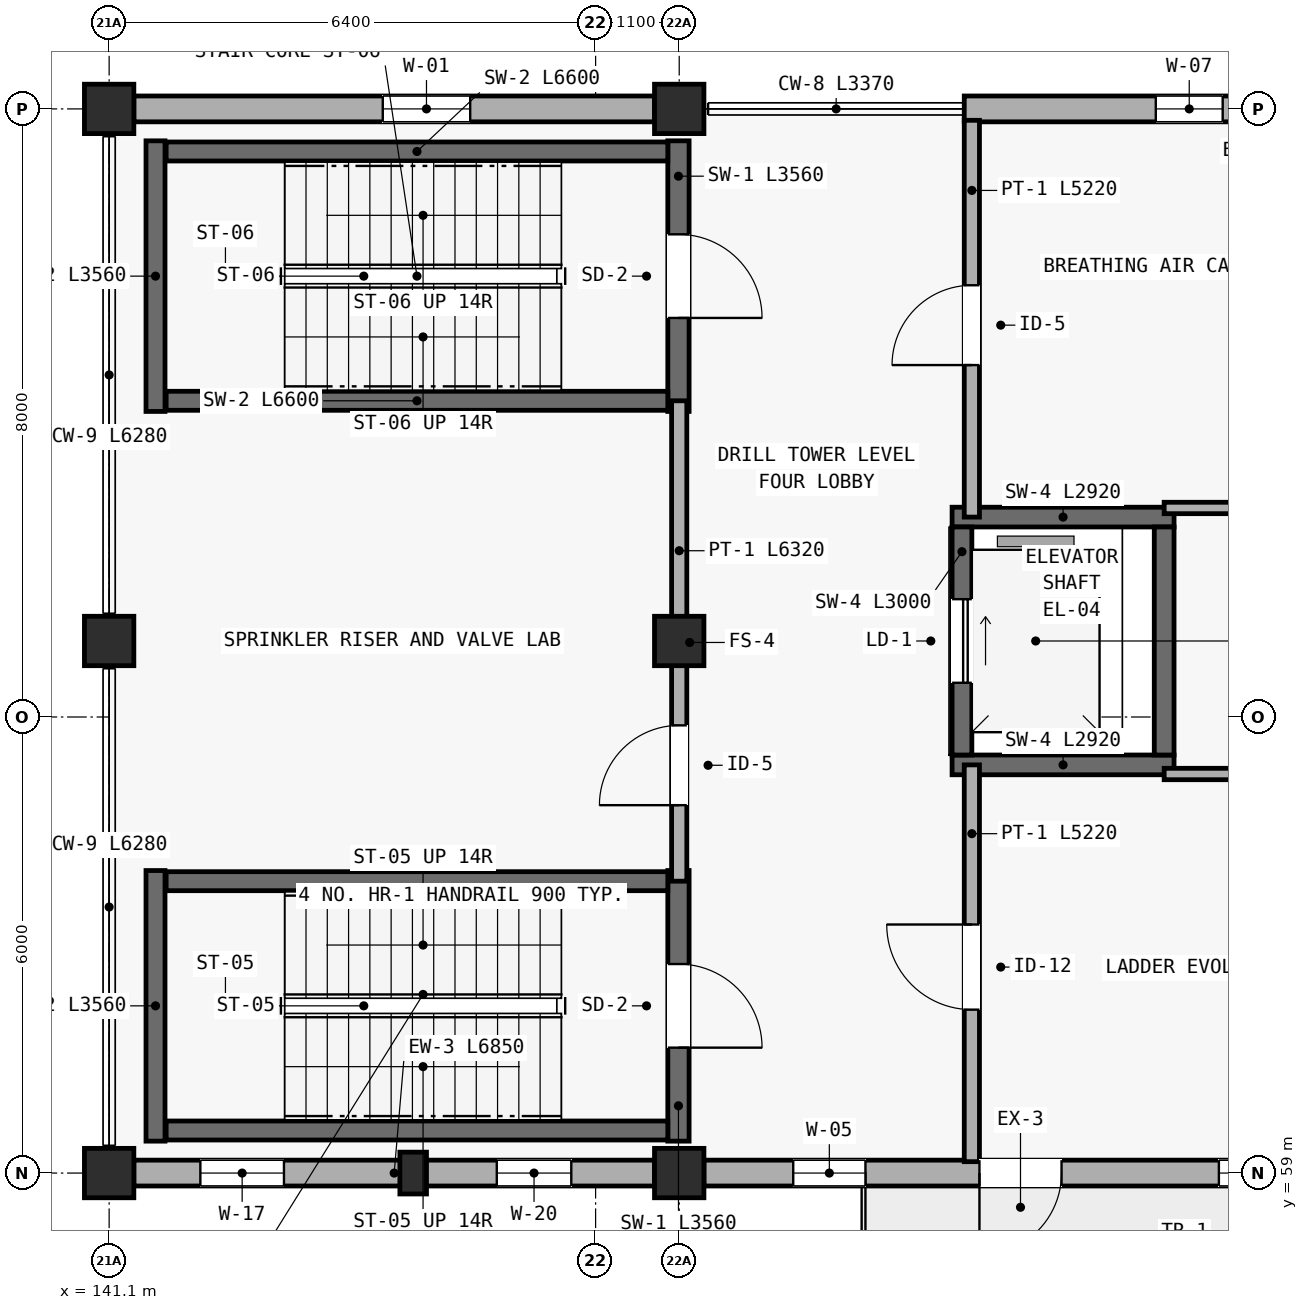
"""IFC4 building model, lengths in metres.
Left out: names, types, materials, properties, quantities, classifications, styles, units other than length and angle.
Written with IfcOpenShell. Run it as: python <this file> out.ifc"""

import sys

from ifc_helpers import new_model, si_unit, direction, frame, frame_2d, origin, origin_2d, place, context, subcontext, project, spatial, rectangle, extrude, element, fill, save


model = new_model("IFC4")
c1 = context("Model", 3, precision=1e-05, world=origin(), true_north=direction((0.0, 1.0)))
c2 = subcontext(c1, "Body", "Model", "MODEL_VIEW")
j1 = project(units=[si_unit("LENGTHUNIT", "METRE"), si_unit("PLANEANGLEUNIT", "RADIAN")], contexts=[c1])
p1 = place(None, origin())
s1 = spatial("IfcSite", under=j1, at=p1, CompositionType="ELEMENT")
p2 = place(p1, origin())
s2 = spatial("IfcBuilding", under=s1, at=p2, CompositionType="ELEMENT")
p3 = place(p2, frame((0.0, 0.0, 12.75)))
s3 = spatial("IfcBuildingStorey", under=s2, at=p3, CompositionType="ELEMENT", Elevation=12.75)
for number, where, z_axis, x_axis in (
    (1, (141.1, 59.0, 0.0), (0.0, 0.0, 1.0), (1.0, 0.0, 0.0)),
    (2, (141.1, 66.0, 0.0), (0.0, 0.0, 1.0), (1.0, 0.0, 0.0)),
    (3, (141.1, 73.0, 0.0), (0.0, 0.0, 1.0), (1.0, 0.0, 0.0)),
    (4, (148.6, 59.0, 0.0), (0.0, 0.0, 1.0), (1.0, 0.0, 0.0)),
    (5, (148.6, 66.0, 0.0), (0.0, 0.0, 1.0), (1.0, 0.0, 0.0)),
    (6, (148.6, 73.0, 0.0), (0.0, 0.0, 1.0), (1.0, 0.0, 0.0)),
):
    element("IfcColumn", number, at=place(p3, frame(where, z_axis=z_axis, x_axis=x_axis)), inside=s3, PredefinedType="COLUMN", context=c2, shape_type="SweptSolid", body=[
        extrude(rectangle(XDim=0.65, YDim=0.65, at=origin_2d()), origin(), (0.0, 0.0, 1.0), 4.65),
    ])
p4 = place(p3, frame((145.1, 59.0, 0.0), z_axis=(0.0, 0.0, 1.0), x_axis=(1.0, 0.0, 0.0)))
e7 = element("IfcColumn", 7, at=p4, inside=s3, PredefinedType="PILASTER", context=c2, shape_type="SweptSolid", body=[
    extrude(rectangle(XDim=0.35, YDim=0.55, at=origin_2d()), origin(), (0.0, 0.0, 1.0), 4.65),
])
p5 = place(p3, frame((141.425, 59.0, 0.0), z_axis=(0.0, 0.0, 1.0), x_axis=(1.0, 0.0, 0.0)))
e8 = element("IfcWall", 8, at=p5, inside=s3, PredefinedType="STANDARD", context=c2, shape_type="SweptSolid", body=[
    extrude(rectangle(XDim=6.85, YDim=0.34, at=frame_2d((3.425, 0.0))), origin(), (0.0, 0.0, 1.0), 3.95),
])
p6 = place(p5, frame((0.875, 0.0, 0.75)))
e9 = element("IfcOpeningElement", 9, at=p6, cuts=e8, PredefinedType="OPENING", context=c2, shape_type="SweptSolid", body=[
    extrude(rectangle(XDim=1.1, YDim=1.35, at=frame_2d((0.55, 0.675))), frame((0.0, 0.18, 0.0), z_axis=(0.0, -1.0, 0.0), x_axis=(1.0, 0.0, 0.0)), (0.0, 0.0, 1.0), 0.36),
])
p7 = place(p5, frame((4.775, 0.0, 0.75)))
e10 = element("IfcOpeningElement", 10, at=p7, cuts=e8, PredefinedType="OPENING", context=c2, shape_type="SweptSolid", body=[
    extrude(rectangle(XDim=0.98, YDim=1.45, at=frame_2d((0.49, 0.725))), frame((0.0, 0.18, 0.0), z_axis=(0.0, -1.0, 0.0), x_axis=(1.0, 0.0, 0.0)), (0.0, 0.0, 1.0), 0.36),
])
p8 = place(p3, frame((148.925, 59.0, 0.0), z_axis=(0.0, 0.0, 1.0), x_axis=(1.0, 0.0, 0.0)))
e11 = element("IfcWall", 11, at=p8, inside=s3, PredefinedType="STANDARD", context=c2, shape_type="SweptSolid", body=[
    extrude(rectangle(XDim=11.75, YDim=0.34, at=frame_2d((5.875, 0.0))), origin(), (0.0, 0.0, 1.0), 3.95),
])
p9 = place(p8, frame((3.625, 0.0, 0.0)))
e12 = element("IfcOpeningElement", 12, at=p9, cuts=e11, PredefinedType="OPENING", context=c2, shape_type="SweptSolid", body=[
    extrude(rectangle(XDim=1.08, YDim=2.1, at=frame_2d((0.54, 1.05))), frame((0.0, 0.18, 0.0), z_axis=(0.0, -1.0, 0.0), x_axis=(1.0, 0.0, 0.0)), (0.0, 0.0, 1.0), 0.36),
])
p10 = place(p8, frame((1.175, 0.0, 0.75)))
e13 = element("IfcOpeningElement", 13, at=p10, cuts=e11, PredefinedType="OPENING", context=c2, shape_type="SweptSolid", body=[
    extrude(rectangle(XDim=0.95, YDim=1.35, at=frame_2d((0.475, 0.675))), frame((0.0, 0.18, 0.0), z_axis=(0.0, -1.0, 0.0), x_axis=(1.0, 0.0, 0.0)), (0.0, 0.0, 1.0), 0.36),
])
p11 = place(p8, frame((6.775, 0.0, 0.75)))
e14 = element("IfcOpeningElement", 14, at=p11, cuts=e11, PredefinedType="OPENING", context=c2, shape_type="SweptSolid", body=[
    extrude(rectangle(XDim=0.95, YDim=1.35, at=frame_2d((0.475, 0.675))), frame((0.0, 0.18, 0.0), z_axis=(0.0, -1.0, 0.0), x_axis=(1.0, 0.0, 0.0)), (0.0, 0.0, 1.0), 0.36),
])
p12 = place(p3, frame((160.675, 73.0, 0.0), z_axis=(0.0, 0.0, 1.0), x_axis=(-1.0, 0.0, 0.0)))
e15 = element("IfcWall", 15, at=p12, inside=s3, PredefinedType="STANDARD", context=c2, shape_type="SweptSolid", body=[
    extrude(rectangle(XDim=8.325, YDim=0.34, at=frame_2d((4.163, 0.0))), origin(), (0.0, 0.0, 1.0), 3.95),
])
p13 = place(p12, frame((1.325, 0.0, 0.75)))
e16 = element("IfcOpeningElement", 16, at=p13, cuts=e15, PredefinedType="OPENING", context=c2, shape_type="SweptSolid", body=[
    extrude(rectangle(XDim=0.88, YDim=1.5, at=frame_2d((0.44, 0.75))), frame((0.0, 0.18, 0.0), z_axis=(0.0, -1.0, 0.0), x_axis=(1.0, 0.0, 0.0)), (0.0, 0.0, 1.0), 0.36),
])
p14 = place(p12, frame((4.925, 0.0, 0.75)))
e17 = element("IfcOpeningElement", 17, at=p14, cuts=e15, PredefinedType="OPENING", context=c2, shape_type="SweptSolid", body=[
    extrude(rectangle(XDim=0.88, YDim=1.5, at=frame_2d((0.44, 0.75))), frame((0.0, 0.18, 0.0), z_axis=(0.0, -1.0, 0.0), x_axis=(1.0, 0.0, 0.0)), (0.0, 0.0, 1.0), 0.36),
])
p15 = place(p3, frame((148.275, 73.0, 0.0), z_axis=(0.0, 0.0, 1.0), x_axis=(-1.0, 0.0, 0.0)))
e18 = element("IfcWall", 18, at=p15, inside=s3, PredefinedType="STANDARD", context=c2, shape_type="SweptSolid", body=[
    extrude(rectangle(XDim=6.85, YDim=0.34, at=frame_2d((3.425, 0.0))), origin(), (0.0, 0.0, 1.0), 3.95),
])
p16 = place(p15, frame((2.425, 0.0, 0.75)))
e19 = element("IfcOpeningElement", 19, at=p16, cuts=e18, PredefinedType="OPENING", context=c2, shape_type="SweptSolid", body=[
    extrude(rectangle(XDim=1.15, YDim=1.45, at=frame_2d((0.575, 0.725))), frame((0.0, 0.18, 0.0), z_axis=(0.0, -1.0, 0.0), x_axis=(1.0, 0.0, 0.0)), (0.0, 0.0, 1.0), 0.36),
])
p17 = place(p3, frame((148.59, 62.98, 0.0), z_axis=(0.0, 0.0, 1.0), x_axis=(0.0, -1.0, 0.0)))
e20 = element("IfcWall", 20, at=p17, inside=s3, PredefinedType="SHEAR", context=c2, shape_type="SweptSolid", body=[
    extrude(rectangle(XDim=3.56, YDim=0.28, at=frame_2d((1.78, 0.0))), origin(), (0.0, 0.0, 1.0), 4.4),
])
p18 = place(p17, frame((1.23, 0.0, 0.0)))
e21 = element("IfcOpeningElement", 21, at=p18, cuts=e20, PredefinedType="OPENING", context=c2, shape_type="SweptSolid", body=[
    extrude(rectangle(XDim=1.1, YDim=2.15, at=frame_2d((0.55, 1.075))), frame((0.0, 0.15, 0.0), z_axis=(0.0, -1.0, 0.0), x_axis=(1.0, 0.0, 0.0)), (0.0, 0.0, 1.0), 0.3),
])
p19 = place(p3, frame((141.71, 59.42, 0.0), z_axis=(0.0, 0.0, 1.0), x_axis=(0.0, 1.0, 0.0)))
e22 = element("IfcWall", 22, at=p19, inside=s3, PredefinedType="SHEAR", context=c2, shape_type="SweptSolid", body=[
    extrude(rectangle(XDim=3.56, YDim=0.25, at=frame_2d((1.78, 0.0))), origin(), (0.0, 0.0, 1.0), 4.4),
])
for number, where, z_axis, x_axis in (
    (23, (148.45, 62.84, 0.0), (0.0, 0.0, 1.0), (-1.0, 0.0, 0.0)),
    (24, (141.85, 59.56, 0.0), (0.0, 0.0, 1.0), (1.0, 0.0, 0.0)),
):
    element("IfcWall", number, at=place(p3, frame(where, z_axis=z_axis, x_axis=x_axis)), inside=s3, PredefinedType="SHEAR", context=c2, shape_type="SweptSolid", body=[
        extrude(rectangle(XDim=6.6, YDim=0.25, at=frame_2d((3.3, 0.0))), origin(), (0.0, 0.0, 1.0), 4.4),
    ])
p20 = place(p3, frame((148.59, 72.58, 0.0), z_axis=(0.0, 0.0, 1.0), x_axis=(0.0, -1.0, 0.0)))
e25 = element("IfcWall", 25, at=p20, inside=s3, PredefinedType="SHEAR", context=c2, shape_type="SweptSolid", body=[
    extrude(rectangle(XDim=3.56, YDim=0.28, at=frame_2d((1.78, 0.0))), origin(), (0.0, 0.0, 1.0), 4.4),
])
p21 = place(p20, frame((1.23, 0.0, 0.0)))
e26 = element("IfcOpeningElement", 26, at=p21, cuts=e25, PredefinedType="OPENING", context=c2, shape_type="SweptSolid", body=[
    extrude(rectangle(XDim=1.1, YDim=2.15, at=frame_2d((0.55, 1.075))), frame((0.0, 0.15, 0.0), z_axis=(0.0, -1.0, 0.0), x_axis=(1.0, 0.0, 0.0)), (0.0, 0.0, 1.0), 0.3),
])
p22 = place(p3, frame((141.71, 69.02, 0.0), z_axis=(0.0, 0.0, 1.0), x_axis=(0.0, 1.0, 0.0)))
e27 = element("IfcWall", 27, at=p22, inside=s3, PredefinedType="SHEAR", context=c2, shape_type="SweptSolid", body=[
    extrude(rectangle(XDim=3.56, YDim=0.25, at=frame_2d((1.78, 0.0))), origin(), (0.0, 0.0, 1.0), 4.4),
])
for number, where, z_axis, x_axis in (
    (28, (148.45, 72.44, 0.0), (0.0, 0.0, 1.0), (-1.0, 0.0, 0.0)),
    (29, (141.85, 69.16, 0.0), (0.0, 0.0, 1.0), (1.0, 0.0, 0.0)),
):
    element("IfcWall", number, at=place(p3, frame(where, z_axis=z_axis, x_axis=x_axis)), inside=s3, PredefinedType="SHEAR", context=c2, shape_type="SweptSolid", body=[
        extrude(rectangle(XDim=6.6, YDim=0.25, at=frame_2d((3.3, 0.0))), origin(), (0.0, 0.0, 1.0), 4.4),
    ])
for number, where, z_axis, x_axis in (
    (30, (152.19, 64.37, 0.0), (0.0, 0.0, 1.0), (1.0, 0.0, 0.0)),
    (31, (155.11, 67.63, 0.0), (0.0, 0.0, 1.0), (-1.0, 0.0, 0.0)),
):
    element("IfcWall", number, at=place(p3, frame(where, z_axis=z_axis, x_axis=x_axis)), inside=s3, PredefinedType="SHEAR", context=c2, shape_type="SweptSolid", body=[
        extrude(rectangle(XDim=2.92, YDim=0.26, at=frame_2d((1.46, 0.0))), origin(), (0.0, 0.0, 1.0), 4.4),
    ])
p23 = place(p3, frame((152.32, 67.5, 0.0), z_axis=(0.0, 0.0, 1.0), x_axis=(0.0, -1.0, 0.0)))
e32 = element("IfcWall", 32, at=p23, inside=s3, PredefinedType="SHEAR", context=c2, shape_type="SweptSolid", body=[
    extrude(rectangle(XDim=3.0, YDim=0.26, at=frame_2d((1.5, 0.0))), origin(), (0.0, 0.0, 1.0), 4.4),
])
p24 = place(p23, frame((0.95, 0.0, 0.0)))
e33 = element("IfcOpeningElement", 33, at=p24, cuts=e32, PredefinedType="OPENING", context=c2, shape_type="SweptSolid", body=[
    extrude(rectangle(XDim=1.1, YDim=2.15, at=frame_2d((0.55, 1.075))), frame((0.0, 0.14, 0.0), z_axis=(0.0, -1.0, 0.0), x_axis=(1.0, 0.0, 0.0)), (0.0, 0.0, 1.0), 0.28),
])
p25 = place(p3, frame((154.98, 64.5, 0.0), z_axis=(0.0, 0.0, 1.0), x_axis=(0.0, 1.0, 0.0)))
e34 = element("IfcWall", 34, at=p25, inside=s3, PredefinedType="SHEAR", context=c2, shape_type="SweptSolid", body=[
    extrude(rectangle(XDim=3.0, YDim=0.26, at=frame_2d((1.5, 0.0))), origin(), (0.0, 0.0, 1.0), 4.4),
])
p26 = place(p3, frame((148.6, 62.84, 0.0), z_axis=(0.0, 0.0, 1.0), x_axis=(0.0, 1.0, 0.0)))
e35 = element("IfcWall", 35, at=p26, inside=s3, PredefinedType="PARTITIONING", context=c2, shape_type="SweptSolid", body=[
    extrude(rectangle(XDim=6.32, YDim=0.2, at=frame_2d((3.16, 0.0))), origin(), (0.0, 0.0, 1.0), 3.9),
])
p27 = place(p26, frame((1.0, 0.0, 0.0)))
e36 = element("IfcOpeningElement", 36, at=p27, cuts=e35, PredefinedType="OPENING", context=c2, shape_type="SweptSolid", body=[
    extrude(rectangle(XDim=1.05, YDim=2.14, at=frame_2d((0.525, 1.07))), frame((0.0, 0.11, 0.0), z_axis=(0.0, -1.0, 0.0), x_axis=(1.0, 0.0, 0.0)), (0.0, 0.0, 1.0), 0.22),
])
p28 = place(p3, frame((152.45, 59.15, 0.0), z_axis=(0.0, 0.0, 1.0), x_axis=(0.0, 1.0, 0.0)))
e37 = element("IfcWall", 37, at=p28, inside=s3, PredefinedType="PARTITIONING", context=c2, shape_type="SweptSolid", body=[
    extrude(rectangle(XDim=5.22, YDim=0.2, at=frame_2d((2.61, 0.0))), origin(), (0.0, 0.0, 1.0), 3.9),
])
p29 = place(p28, frame((2.0, 0.0, 0.0)))
e38 = element("IfcOpeningElement", 38, at=p29, cuts=e37, PredefinedType="OPENING", context=c2, shape_type="SweptSolid", body=[
    extrude(rectangle(XDim=1.12, YDim=2.15, at=frame_2d((0.56, 1.075))), frame((0.0, 0.11, 0.0), z_axis=(0.0, -1.0, 0.0), x_axis=(1.0, 0.0, 0.0)), (0.0, 0.0, 1.0), 0.22),
])
p30 = place(p3, frame((152.45, 67.63, 0.0), z_axis=(0.0, 0.0, 1.0), x_axis=(0.0, 1.0, 0.0)))
e39 = element("IfcWall", 39, at=p30, inside=s3, PredefinedType="PARTITIONING", context=c2, shape_type="SweptSolid", body=[
    extrude(rectangle(XDim=5.22, YDim=0.2, at=frame_2d((2.61, 0.0))), origin(), (0.0, 0.0, 1.0), 3.9),
])
p31 = place(p30, frame((2.0, 0.0, 0.0)))
e40 = element("IfcOpeningElement", 40, at=p31, cuts=e39, PredefinedType="OPENING", context=c2, shape_type="SweptSolid", body=[
    extrude(rectangle(XDim=1.05, YDim=2.14, at=frame_2d((0.525, 1.07))), frame((0.0, 0.11, 0.0), z_axis=(0.0, -1.0, 0.0), x_axis=(1.0, 0.0, 0.0)), (0.0, 0.0, 1.0), 0.22),
])
p32 = place(p3, frame((154.98, 64.25, 0.0), z_axis=(0.0, 0.0, 1.0), x_axis=(1.0, 0.0, 0.0)))
e41 = element("IfcWall", 41, at=p32, inside=s3, PredefinedType="PARTITIONING", context=c2, shape_type="SweptSolid", body=[
    extrude(rectangle(XDim=5.87, YDim=0.15, at=frame_2d((2.935, 0.0))), origin(), (0.0, 0.0, 1.0), 3.9),
])
p33 = place(p3, frame((154.98, 67.75, 0.0), z_axis=(0.0, 0.0, 1.0), x_axis=(1.0, 0.0, 0.0)))
e42 = element("IfcWall", 42, at=p33, inside=s3, PredefinedType="PARTITIONING", context=c2, shape_type="SweptSolid", body=[
    extrude(rectangle(XDim=5.87, YDim=0.15, at=frame_2d((2.935, 0.0))), origin(), (0.0, 0.0, 1.0), 3.9),
])
p34 = place(p33, frame((2.2, 0.0, 0.0)))
e43 = element("IfcOpeningElement", 43, at=p34, cuts=e42, PredefinedType="OPENING", context=c2, shape_type="SweptSolid", body=[
    extrude(rectangle(XDim=0.92, YDim=2.1, at=frame_2d((0.46, 1.05))), frame((0.0, 0.085, 0.0), z_axis=(0.0, -1.0, 0.0), x_axis=(1.0, 0.0, 0.0)), (0.0, 0.0, 1.0), 0.17),
])
p35 = place(p6, origin())
e44 = element("IfcWindow", 44, at=p35, inside=s3, PartitioningType="SINGLE_PANEL", PredefinedType="WINDOW", context=c2, shape_type="SweptSolid", body=[
    extrude(rectangle(XDim=1.1, YDim=1.35, at=frame_2d((0.55, 0.675))), frame((0.0, 0.03, 0.0), z_axis=(0.0, -1.0, 0.0), x_axis=(1.0, 0.0, 0.0)), (0.0, 0.0, 1.0), 0.06),
])
fill(e9, e44)
p36 = place(p7, origin())
e45 = element("IfcWindow", 45, at=p36, inside=s3, PartitioningType="SINGLE_PANEL", PredefinedType="WINDOW", context=c2, shape_type="SweptSolid", body=[
    extrude(rectangle(XDim=0.98, YDim=1.45, at=frame_2d((0.49, 0.725))), frame((0.0, 0.03, 0.0), z_axis=(0.0, -1.0, 0.0), x_axis=(1.0, 0.0, 0.0)), (0.0, 0.0, 1.0), 0.06),
])
fill(e10, e45)
p37 = place(p9, frame((1.08, 0.0, 0.0), z_axis=(0.0, 0.0, 1.0), x_axis=(-1.0, 0.0, 0.0)))
e46 = element("IfcDoor", 46, at=p37, inside=s3, OperationType="SINGLE_SWING_LEFT", PredefinedType="DOOR", context=c2, shape_type="SweptSolid", body=[
    extrude(rectangle(XDim=1.08, YDim=2.1, at=frame_2d((0.54, 1.05))), frame((0.0, 0.025, 0.0), z_axis=(0.0, -1.0, 0.0), x_axis=(1.0, 0.0, 0.0)), (0.0, 0.0, 1.0), 0.05),
])
fill(e12, e46)
p38 = place(p10, origin())
e47 = element("IfcWindow", 47, at=p38, inside=s3, PartitioningType="SINGLE_PANEL", PredefinedType="WINDOW", context=c2, shape_type="SweptSolid", body=[
    extrude(rectangle(XDim=0.95, YDim=1.35, at=frame_2d((0.475, 0.675))), frame((0.0, 0.03, 0.0), z_axis=(0.0, -1.0, 0.0), x_axis=(1.0, 0.0, 0.0)), (0.0, 0.0, 1.0), 0.06),
])
fill(e13, e47)
p39 = place(p11, origin())
e48 = element("IfcWindow", 48, at=p39, inside=s3, PartitioningType="SINGLE_PANEL", PredefinedType="WINDOW", context=c2, shape_type="SweptSolid", body=[
    extrude(rectangle(XDim=0.95, YDim=1.35, at=frame_2d((0.475, 0.675))), frame((0.0, 0.03, 0.0), z_axis=(0.0, -1.0, 0.0), x_axis=(1.0, 0.0, 0.0)), (0.0, 0.0, 1.0), 0.06),
])
fill(e14, e48)
p40 = place(p14, origin())
e49 = element("IfcWindow", 49, at=p40, inside=s3, PartitioningType="SINGLE_PANEL", PredefinedType="WINDOW", context=c2, shape_type="SweptSolid", body=[
    extrude(rectangle(XDim=0.88, YDim=1.5, at=frame_2d((0.44, 0.75))), frame((0.0, 0.03, 0.0), z_axis=(0.0, -1.0, 0.0), x_axis=(1.0, 0.0, 0.0)), (0.0, 0.0, 1.0), 0.06),
])
fill(e17, e49)
p41 = place(p16, origin())
e50 = element("IfcWindow", 50, at=p41, inside=s3, PartitioningType="SINGLE_PANEL", PredefinedType="WINDOW", context=c2, shape_type="SweptSolid", body=[
    extrude(rectangle(XDim=1.15, YDim=1.45, at=frame_2d((0.575, 0.725))), frame((0.0, 0.03, 0.0), z_axis=(0.0, -1.0, 0.0), x_axis=(1.0, 0.0, 0.0)), (0.0, 0.0, 1.0), 0.06),
])
fill(e19, e50)
p42 = place(p18, origin())
e51 = element("IfcDoor", 51, at=p42, inside=s3, OperationType="SINGLE_SWING_RIGHT", PredefinedType="DOOR", context=c2, shape_type="SweptSolid", body=[
    extrude(rectangle(XDim=1.1, YDim=2.15, at=frame_2d((0.55, 1.075))), frame((0.0, 0.025, 0.0), z_axis=(0.0, -1.0, 0.0), x_axis=(1.0, 0.0, 0.0)), (0.0, 0.0, 1.0), 0.05),
])
fill(e21, e51)
p43 = place(p21, origin())
e52 = element("IfcDoor", 52, at=p43, inside=s3, OperationType="SINGLE_SWING_RIGHT", PredefinedType="DOOR", context=c2, shape_type="SweptSolid", body=[
    extrude(rectangle(XDim=1.1, YDim=2.15, at=frame_2d((0.55, 1.075))), frame((0.0, 0.025, 0.0), z_axis=(0.0, -1.0, 0.0), x_axis=(1.0, 0.0, 0.0)), (0.0, 0.0, 1.0), 0.05),
])
fill(e26, e52)
p44 = place(p24, origin())
e53 = element("IfcDoor", 53, at=p44, inside=s3, OperationType="SLIDING_TO_LEFT", PredefinedType="DOOR", context=c2, shape_type="SweptSolid", body=[
    extrude(rectangle(XDim=1.1, YDim=2.15, at=frame_2d((0.55, 1.075))), frame((0.0, 0.025, 0.0), z_axis=(0.0, -1.0, 0.0), x_axis=(1.0, 0.0, 0.0)), (0.0, 0.0, 1.0), 0.05),
])
fill(e33, e53)
p45 = place(p27, origin())
e54 = element("IfcDoor", 54, at=p45, inside=s3, OperationType="SINGLE_SWING_LEFT", PredefinedType="DOOR", context=c2, shape_type="SweptSolid", body=[
    extrude(rectangle(XDim=1.05, YDim=2.14, at=frame_2d((0.525, 1.07))), frame((0.0, 0.025, 0.0), z_axis=(0.0, -1.0, 0.0), x_axis=(1.0, 0.0, 0.0)), (0.0, 0.0, 1.0), 0.05),
])
fill(e36, e54)
p46 = place(p29, origin())
e55 = element("IfcDoor", 55, at=p46, inside=s3, OperationType="SINGLE_SWING_RIGHT", PredefinedType="DOOR", context=c2, shape_type="SweptSolid", body=[
    extrude(rectangle(XDim=1.12, YDim=2.15, at=frame_2d((0.56, 1.075))), frame((0.0, 0.025, 0.0), z_axis=(0.0, -1.0, 0.0), x_axis=(1.0, 0.0, 0.0)), (0.0, 0.0, 1.0), 0.05),
])
fill(e38, e55)
p47 = place(p31, origin())
e56 = element("IfcDoor", 56, at=p47, inside=s3, OperationType="SINGLE_SWING_LEFT", PredefinedType="DOOR", context=c2, shape_type="SweptSolid", body=[
    extrude(rectangle(XDim=1.05, YDim=2.14, at=frame_2d((0.525, 1.07))), frame((0.0, 0.025, 0.0), z_axis=(0.0, -1.0, 0.0), x_axis=(1.0, 0.0, 0.0)), (0.0, 0.0, 1.0), 0.05),
])
fill(e40, e56)
save(model, sys.argv[1])
